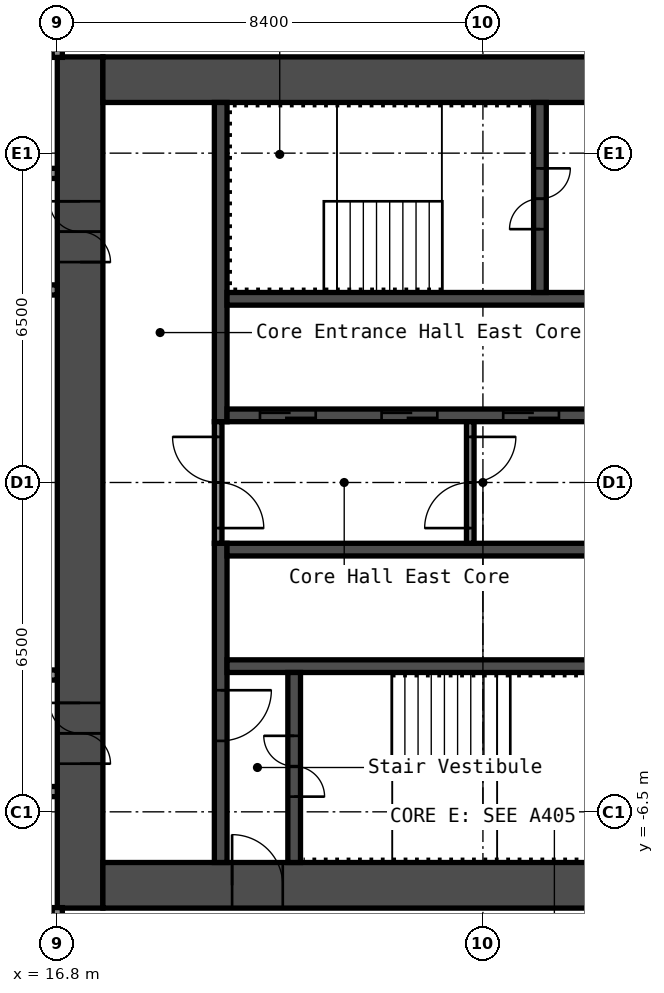
"""IFC4 building model, lengths in metres.
Left out: names, types, materials, properties, quantities, classifications, styles, units other than length and angle.
Written with IfcOpenShell. Run it as: python <this file> out.ifc"""

import sys

from ifc_helpers import new_model, si_unit, direction, frame, frame_2d, origin, place, context, subcontext, project, spatial, rectangle, extrude, element, fill, save


model = new_model("IFC4")
c1 = context("Model", 3, precision=1e-05, world=origin(), true_north=direction((0.0, 1.0)))
c2 = subcontext(c1, "Body", "Model", "MODEL_VIEW")
j1 = project(units=[si_unit("LENGTHUNIT", "METRE"), si_unit("PLANEANGLEUNIT", "RADIAN")], contexts=[c1])
p1 = place(None, origin())
s1 = spatial("IfcSite", under=j1, at=p1, CompositionType="ELEMENT")
p2 = place(p1, origin())
s2 = spatial("IfcBuilding", under=s1, at=p2, CompositionType="ELEMENT")
p3 = place(p2, frame((0.0, 0.0, 32.6)))
s3 = spatial("IfcBuildingStorey", under=s2, at=p3, CompositionType="ELEMENT", Elevation=32.6)
p4 = place(p3, frame((17.25, -8.4, 0.0), z_axis=(0.0, 0.0, 1.0), x_axis=(0.0, 1.0, 0.0)))
e1 = element("IfcWall", 1, at=p4, inside=s3, PredefinedType="SHEAR", context=c2, shape_type="SweptSolid", body=[
    extrude(rectangle(XDim=16.8, YDim=0.9, at=frame_2d((8.4, 0.0))), origin(), (0.0, 0.0, 1.0), 2.8),
])
p5 = place(p4, frame((12.75, 0.0, 0.0)))
e2 = element("IfcOpeningElement", 2, at=p5, cuts=e1, PredefinedType="OPENING", context=c2, shape_type="SweptSolid", body=[
    extrude(rectangle(XDim=1.2, YDim=2.1, at=frame_2d((0.6, 1.05))), frame((0.0, 0.46, 0.0), z_axis=(0.0, -1.0, 0.0), x_axis=(1.0, 0.0, 0.0)), (0.0, 0.0, 1.0), 0.92),
])
p6 = place(p4, frame((2.85, 0.0, 0.0)))
e3 = element("IfcOpeningElement", 3, at=p6, cuts=e1, PredefinedType="OPENING", context=c2, shape_type="SweptSolid", body=[
    extrude(rectangle(XDim=1.2, YDim=2.1, at=frame_2d((0.6, 1.05))), frame((0.0, 0.46, 0.0), z_axis=(0.0, -1.0, 0.0), x_axis=(1.0, 0.0, 0.0)), (0.0, 0.0, 1.0), 0.92),
])
p7 = place(p3, frame((17.7, 7.95, 0.0), z_axis=(0.0, 0.0, 1.0), x_axis=(1.0, 0.0, 0.0)))
e4 = element("IfcWall", 4, at=p7, inside=s3, PredefinedType="SHEAR", context=c2, shape_type="SweptSolid", body=[
    extrude(rectangle(XDim=15.0, YDim=0.9, at=frame_2d((7.5, 0.0))), origin(), (0.0, 0.0, 1.0), 2.8),
])
p8 = place(p7, frame((10.4, 0.0, 0.0)))
e5 = element("IfcOpeningElement", 5, at=p8, cuts=e4, PredefinedType="OPENING", context=c2, shape_type="SweptSolid", body=[
    extrude(rectangle(XDim=1.2, YDim=2.1, at=frame_2d((0.6, 1.05))), frame((0.0, 0.46, 0.0), z_axis=(0.0, -1.0, 0.0), x_axis=(1.0, 0.0, 0.0)), (0.0, 0.0, 1.0), 0.92),
])
p9 = place(p7, frame((13.35, 0.0, 0.0)))
e6 = element("IfcOpeningElement", 6, at=p9, cuts=e4, PredefinedType="OPENING", context=c2, shape_type="SweptSolid", body=[
    extrude(rectangle(XDim=0.9, YDim=2.1, at=frame_2d((0.45, 1.05))), frame((0.0, 0.46, 0.0), z_axis=(0.0, -1.0, 0.0), x_axis=(1.0, 0.0, 0.0)), (0.0, 0.0, 1.0), 0.92),
])
p10 = place(p3, frame((17.7, -7.95, 0.0), z_axis=(0.0, 0.0, 1.0), x_axis=(1.0, 0.0, 0.0)))
e7 = element("IfcWall", 7, at=p10, inside=s3, PredefinedType="SHEAR", context=c2, shape_type="SweptSolid", body=[
    extrude(rectangle(XDim=15.0, YDim=0.9, at=frame_2d((7.5, 0.0))), origin(), (0.0, 0.0, 1.0), 2.8),
])
p11 = place(p10, frame((2.55, 0.0, 0.0)))
e8 = element("IfcOpeningElement", 8, at=p11, cuts=e7, PredefinedType="OPENING", context=c2, shape_type="SweptSolid", body=[
    extrude(rectangle(XDim=1.0, YDim=2.1, at=frame_2d((0.5, 1.05))), frame((0.0, 0.46, 0.0), z_axis=(0.0, -1.0, 0.0), x_axis=(1.0, 0.0, 0.0)), (0.0, 0.0, 1.0), 0.92),
])
p12 = place(p3, frame((20.025, 1.2, 0.0), z_axis=(0.0, 0.0, 1.0), x_axis=(0.0, 1.0, 0.0)))
e9 = element("IfcWall", 9, at=p12, inside=s3, PredefinedType="SHEAR", context=c2, shape_type="SweptSolid", body=[
    extrude(rectangle(XDim=6.3, YDim=0.25, at=frame_2d((3.15, 0.0))), origin(), (0.0, 0.0, 1.0), 2.8),
])
p13 = place(p3, frame((20.025, -7.5, 0.0), z_axis=(0.0, 0.0, 1.0), x_axis=(0.0, 1.0, 0.0)))
e10 = element("IfcWall", 10, at=p13, inside=s3, PredefinedType="SHEAR", context=c2, shape_type="SweptSolid", body=[
    extrude(rectangle(XDim=6.3, YDim=0.25, at=frame_2d((3.15, 0.0))), origin(), (0.0, 0.0, 1.0), 2.8),
])
p14 = place(p13, frame((2.4, 0.0, 0.0)))
e11 = element("IfcOpeningElement", 11, at=p14, cuts=e10, PredefinedType="OPENING", context=c2, shape_type="SweptSolid", body=[
    extrude(rectangle(XDim=1.0, YDim=2.1, at=frame_2d((0.5, 1.05))), frame((0.0, 0.135, 0.0), z_axis=(0.0, -1.0, 0.0), x_axis=(1.0, 0.0, 0.0)), (0.0, 0.0, 1.0), 0.27),
])
p15 = place(p3, frame((20.15, 1.325, 0.0), z_axis=(0.0, 0.0, 1.0), x_axis=(1.0, 0.0, 0.0)))
e12 = element("IfcWall", 12, at=p15, inside=s3, PredefinedType="SHEAR", context=c2, shape_type="SweptSolid", body=[
    extrude(rectangle(XDim=7.5, YDim=0.25, at=frame_2d((3.75, 0.0))), origin(), (0.0, 0.0, 1.0), 2.8),
])
p16 = place(p15, frame((0.65, 0.0, 0.0)))
e13 = element("IfcOpeningElement", 13, at=p16, cuts=e12, PredefinedType="OPENING", context=c2, shape_type="SweptSolid", body=[
    extrude(rectangle(XDim=1.1, YDim=2.1, at=frame_2d((0.55, 1.05))), frame((0.0, 0.135, 0.0), z_axis=(0.0, -1.0, 0.0), x_axis=(1.0, 0.0, 0.0)), (0.0, 0.0, 1.0), 0.27),
])
p17 = place(p15, frame((3.05, 0.0, 0.0)))
e14 = element("IfcOpeningElement", 14, at=p17, cuts=e12, PredefinedType="OPENING", context=c2, shape_type="SweptSolid", body=[
    extrude(rectangle(XDim=1.1, YDim=2.1, at=frame_2d((0.55, 1.05))), frame((0.0, 0.135, 0.0), z_axis=(0.0, -1.0, 0.0), x_axis=(1.0, 0.0, 0.0)), (0.0, 0.0, 1.0), 0.27),
])
p18 = place(p15, frame((5.45, 0.0, 0.0)))
e15 = element("IfcOpeningElement", 15, at=p18, cuts=e12, PredefinedType="OPENING", context=c2, shape_type="SweptSolid", body=[
    extrude(rectangle(XDim=1.1, YDim=2.1, at=frame_2d((0.55, 1.05))), frame((0.0, 0.135, 0.0), z_axis=(0.0, -1.0, 0.0), x_axis=(1.0, 0.0, 0.0)), (0.0, 0.0, 1.0), 0.27),
])
p19 = place(p3, frame((20.15, 3.625, 0.0), z_axis=(0.0, 0.0, 1.0), x_axis=(1.0, 0.0, 0.0)))
e16 = element("IfcWall", 16, at=p19, inside=s3, PredefinedType="SHEAR", context=c2, shape_type="SweptSolid", body=[
    extrude(rectangle(XDim=7.5, YDim=0.25, at=frame_2d((3.75, 0.0))), origin(), (0.0, 0.0, 1.0), 2.8),
])
p20 = place(p3, frame((26.325, 3.75, 0.0), z_axis=(0.0, 0.0, 1.0), x_axis=(0.0, 1.0, 0.0)))
e17 = element("IfcWall", 17, at=p20, inside=s3, PredefinedType="SHEAR", context=c2, shape_type="SweptSolid", body=[
    extrude(rectangle(XDim=3.75, YDim=0.25, at=frame_2d((1.875, 0.0))), origin(), (0.0, 0.0, 1.0), 2.8),
])
p21 = place(p20, frame((1.25, 0.0, 0.0)))
e18 = element("IfcOpeningElement", 18, at=p21, cuts=e17, PredefinedType="OPENING", context=c2, shape_type="SweptSolid", body=[
    extrude(rectangle(XDim=1.2, YDim=2.1, at=frame_2d((0.6, 1.05))), frame((0.0, 0.135, 0.0), z_axis=(0.0, -1.0, 0.0), x_axis=(1.0, 0.0, 0.0)), (0.0, 0.0, 1.0), 0.27),
])
for number, where, z_axis, x_axis in (
    (19, (20.15, -1.325, 0.0), (0.0, 0.0, 1.0), (1.0, 0.0, 0.0)),
    (20, (20.15, -3.625, 0.0), (0.0, 0.0, 1.0), (1.0, 0.0, 0.0)),
):
    element("IfcWall", number, at=place(p3, frame(where, z_axis=z_axis, x_axis=x_axis)), inside=s3, PredefinedType="SHEAR", context=c2, shape_type="SweptSolid", body=[
        extrude(rectangle(XDim=7.5, YDim=0.25, at=frame_2d((3.75, 0.0))), origin(), (0.0, 0.0, 1.0), 2.8),
    ])
p22 = place(p3, frame((21.475, -7.5, 0.0), z_axis=(0.0, 0.0, 1.0), x_axis=(0.0, 1.0, 0.0)))
e21 = element("IfcWall", 21, at=p22, inside=s3, PredefinedType="SHEAR", context=c2, shape_type="SweptSolid", body=[
    extrude(rectangle(XDim=3.75, YDim=0.25, at=frame_2d((1.875, 0.0))), origin(), (0.0, 0.0, 1.0), 2.8),
])
p23 = place(p22, frame((1.3, 0.0, 0.0)))
e22 = element("IfcOpeningElement", 22, at=p23, cuts=e21, PredefinedType="OPENING", context=c2, shape_type="SweptSolid", body=[
    extrude(rectangle(XDim=1.2, YDim=2.1, at=frame_2d((0.6, 1.05))), frame((0.0, 0.135, 0.0), z_axis=(0.0, -1.0, 0.0), x_axis=(1.0, 0.0, 0.0)), (0.0, 0.0, 1.0), 0.27),
])
p24 = place(p3, frame((19.975, -1.2, 0.0), z_axis=(0.0, 0.0, 1.0), x_axis=(0.0, 1.0, 0.0)))
e23 = element("IfcWall", 23, at=p24, inside=s3, PredefinedType="PARTITIONING", context=c2, shape_type="SweptSolid", body=[
    extrude(rectangle(XDim=2.4, YDim=0.15, at=frame_2d((1.2, 0.0))), origin(), (0.0, 0.0, 1.0), 2.8),
])
p25 = place(p24, frame((0.3, 0.0, 0.0)))
e24 = element("IfcOpeningElement", 24, at=p25, cuts=e23, PredefinedType="OPENING", context=c2, shape_type="SweptSolid", body=[
    extrude(rectangle(XDim=1.8, YDim=2.1, at=frame_2d((0.9, 1.05))), frame((0.0, 0.085, 0.0), z_axis=(0.0, -1.0, 0.0), x_axis=(1.0, 0.0, 0.0)), (0.0, 0.0, 1.0), 0.17),
])
p26 = place(p3, frame((24.95, -1.2, 0.0), z_axis=(0.0, 0.0, 1.0), x_axis=(0.0, 1.0, 0.0)))
e25 = element("IfcWall", 25, at=p26, inside=s3, PredefinedType="PARTITIONING", context=c2, shape_type="SweptSolid", body=[
    extrude(rectangle(XDim=2.4, YDim=0.15, at=frame_2d((1.2, 0.0))), origin(), (0.0, 0.0, 1.0), 2.8),
])
p27 = place(p26, frame((0.3, 0.0, 0.0)))
e26 = element("IfcOpeningElement", 26, at=p27, cuts=e25, PredefinedType="OPENING", context=c2, shape_type="SweptSolid", body=[
    extrude(rectangle(XDim=1.8, YDim=2.1, at=frame_2d((0.9, 1.05))), frame((0.0, 0.085, 0.0), z_axis=(0.0, -1.0, 0.0), x_axis=(1.0, 0.0, 0.0)), (0.0, 0.0, 1.0), 0.17),
])
p28 = place(p3, frame((-16.8, -6.1, 0.0), z_axis=(0.0, 0.0, 1.0), x_axis=(1.0, 0.0, 0.0)))
e27 = element("IfcWall", 27, at=p28, inside=s3, PredefinedType="PARTITIONING", context=c2, shape_type="SweptSolid", body=[
    extrude(rectangle(XDim=33.6, YDim=0.2, at=frame_2d((16.8, 0.0))), origin(), (0.0, 0.0, 1.0), 2.8),
])
p29 = place(p28, frame((1.6, 0.0, 0.0)))
e28 = element("IfcOpeningElement", 28, at=p29, cuts=e27, PredefinedType="OPENING", context=c2, shape_type="SweptSolid", body=[
    extrude(rectangle(XDim=1.0, YDim=2.1, at=frame_2d((0.5, 1.05))), frame((0.0, 0.11, 0.0), z_axis=(0.0, -1.0, 0.0), x_axis=(1.0, 0.0, 0.0)), (0.0, 0.0, 1.0), 0.22),
])
p30 = place(p28, frame((10.0, 0.0, 0.0)))
e29 = element("IfcOpeningElement", 29, at=p30, cuts=e27, PredefinedType="OPENING", context=c2, shape_type="SweptSolid", body=[
    extrude(rectangle(XDim=1.0, YDim=2.1, at=frame_2d((0.5, 1.05))), frame((0.0, 0.11, 0.0), z_axis=(0.0, -1.0, 0.0), x_axis=(1.0, 0.0, 0.0)), (0.0, 0.0, 1.0), 0.22),
])
p31 = place(p28, frame((22.6, 0.0, 0.0)))
e30 = element("IfcOpeningElement", 30, at=p31, cuts=e27, PredefinedType="OPENING", context=c2, shape_type="SweptSolid", body=[
    extrude(rectangle(XDim=1.0, YDim=2.1, at=frame_2d((0.5, 1.05))), frame((0.0, 0.11, 0.0), z_axis=(0.0, -1.0, 0.0), x_axis=(1.0, 0.0, 0.0)), (0.0, 0.0, 1.0), 0.22),
])
p32 = place(p28, frame((27.1, 0.0, 0.0)))
e31 = element("IfcOpeningElement", 31, at=p32, cuts=e27, PredefinedType="OPENING", context=c2, shape_type="SweptSolid", body=[
    extrude(rectangle(XDim=1.0, YDim=2.1, at=frame_2d((0.5, 1.05))), frame((0.0, 0.11, 0.0), z_axis=(0.0, -1.0, 0.0), x_axis=(1.0, 0.0, 0.0)), (0.0, 0.0, 1.0), 0.22),
])
p33 = place(p3, frame((-16.8, -3.8, 0.0), z_axis=(0.0, 0.0, 1.0), x_axis=(1.0, 0.0, 0.0)))
e32 = element("IfcWall", 32, at=p33, inside=s3, PredefinedType="PARTITIONING", context=c2, shape_type="SweptSolid", body=[
    extrude(rectangle(XDim=33.6, YDim=0.2, at=frame_2d((16.8, 0.0))), origin(), (0.0, 0.0, 1.0), 2.8),
])
p34 = place(p33, frame((10.3, 0.0, 0.0)))
e33 = element("IfcOpeningElement", 33, at=p34, cuts=e32, PredefinedType="OPENING", context=c2, shape_type="SweptSolid", body=[
    extrude(rectangle(XDim=0.9, YDim=2.1, at=frame_2d((0.45, 1.05))), frame((0.0, 0.11, 0.0), z_axis=(0.0, -1.0, 0.0), x_axis=(1.0, 0.0, 0.0)), (0.0, 0.0, 1.0), 0.22),
])
p35 = place(p33, frame((14.5, 0.0, 0.0)))
e34 = element("IfcOpeningElement", 34, at=p35, cuts=e32, PredefinedType="OPENING", context=c2, shape_type="SweptSolid", body=[
    extrude(rectangle(XDim=0.9, YDim=2.1, at=frame_2d((0.45, 1.05))), frame((0.0, 0.11, 0.0), z_axis=(0.0, -1.0, 0.0), x_axis=(1.0, 0.0, 0.0)), (0.0, 0.0, 1.0), 0.22),
])
p36 = place(p33, frame((27.02, 0.0, 0.0)))
e35 = element("IfcOpeningElement", 35, at=p36, cuts=e32, PredefinedType="OPENING", context=c2, shape_type="SweptSolid", body=[
    extrude(rectangle(XDim=0.9, YDim=2.1, at=frame_2d((0.45, 1.05))), frame((0.0, 0.11, 0.0), z_axis=(0.0, -1.0, 0.0), x_axis=(1.0, 0.0, 0.0)), (0.0, 0.0, 1.0), 0.22),
])
p37 = place(p33, frame((31.22, 0.0, 0.0)))
e36 = element("IfcOpeningElement", 36, at=p37, cuts=e32, PredefinedType="OPENING", context=c2, shape_type="SweptSolid", body=[
    extrude(rectangle(XDim=0.9, YDim=2.1, at=frame_2d((0.45, 1.05))), frame((0.0, 0.11, 0.0), z_axis=(0.0, -1.0, 0.0), x_axis=(1.0, 0.0, 0.0)), (0.0, 0.0, 1.0), 0.22),
])
p38 = place(p3, frame((-16.8, 3.8, 0.0), z_axis=(0.0, 0.0, 1.0), x_axis=(1.0, 0.0, 0.0)))
e37 = element("IfcWall", 37, at=p38, inside=s3, PredefinedType="PARTITIONING", context=c2, shape_type="SweptSolid", body=[
    extrude(rectangle(XDim=33.6, YDim=0.2, at=frame_2d((16.8, 0.0))), origin(), (0.0, 0.0, 1.0), 2.8),
])
p39 = place(p38, frame((1.4, 0.0, 0.0)))
e38 = element("IfcOpeningElement", 38, at=p39, cuts=e37, PredefinedType="OPENING", context=c2, shape_type="SweptSolid", body=[
    extrude(rectangle(XDim=0.9, YDim=2.1, at=frame_2d((0.45, 1.05))), frame((0.0, 0.11, 0.0), z_axis=(0.0, -1.0, 0.0), x_axis=(1.0, 0.0, 0.0)), (0.0, 0.0, 1.0), 0.22),
])
p40 = place(p38, frame((5.6, 0.0, 0.0)))
e39 = element("IfcOpeningElement", 39, at=p40, cuts=e37, PredefinedType="OPENING", context=c2, shape_type="SweptSolid", body=[
    extrude(rectangle(XDim=0.9, YDim=2.1, at=frame_2d((0.45, 1.05))), frame((0.0, 0.11, 0.0), z_axis=(0.0, -1.0, 0.0), x_axis=(1.0, 0.0, 0.0)), (0.0, 0.0, 1.0), 0.22),
])
p41 = place(p38, frame((18.87, 0.0, 0.0)))
e40 = element("IfcOpeningElement", 40, at=p41, cuts=e37, PredefinedType="OPENING", context=c2, shape_type="SweptSolid", body=[
    extrude(rectangle(XDim=0.9, YDim=2.1, at=frame_2d((0.45, 1.05))), frame((0.0, 0.11, 0.0), z_axis=(0.0, -1.0, 0.0), x_axis=(1.0, 0.0, 0.0)), (0.0, 0.0, 1.0), 0.22),
])
p42 = place(p38, frame((23.07, 0.0, 0.0)))
e41 = element("IfcOpeningElement", 41, at=p42, cuts=e37, PredefinedType="OPENING", context=c2, shape_type="SweptSolid", body=[
    extrude(rectangle(XDim=0.9, YDim=2.1, at=frame_2d((0.45, 1.05))), frame((0.0, 0.11, 0.0), z_axis=(0.0, -1.0, 0.0), x_axis=(1.0, 0.0, 0.0)), (0.0, 0.0, 1.0), 0.22),
])
p43 = place(p3, frame((-16.8, 6.1, 0.0), z_axis=(0.0, 0.0, 1.0), x_axis=(1.0, 0.0, 0.0)))
e42 = element("IfcWall", 42, at=p43, inside=s3, PredefinedType="PARTITIONING", context=c2, shape_type="SweptSolid", body=[
    extrude(rectangle(XDim=33.6, YDim=0.2, at=frame_2d((16.8, 0.0))), origin(), (0.0, 0.0, 1.0), 2.8),
])
p44 = place(p43, frame((1.9, 0.0, 0.0)))
e43 = element("IfcOpeningElement", 43, at=p44, cuts=e42, PredefinedType="OPENING", context=c2, shape_type="SweptSolid", body=[
    extrude(rectangle(XDim=1.0, YDim=2.1, at=frame_2d((0.5, 1.05))), frame((0.0, 0.11, 0.0), z_axis=(0.0, -1.0, 0.0), x_axis=(1.0, 0.0, 0.0)), (0.0, 0.0, 1.0), 0.22),
])
p45 = place(p43, frame((14.2, 0.0, 0.0)))
e44 = element("IfcOpeningElement", 44, at=p45, cuts=e42, PredefinedType="OPENING", context=c2, shape_type="SweptSolid", body=[
    extrude(rectangle(XDim=1.0, YDim=2.1, at=frame_2d((0.5, 1.05))), frame((0.0, 0.11, 0.0), z_axis=(0.0, -1.0, 0.0), x_axis=(1.0, 0.0, 0.0)), (0.0, 0.0, 1.0), 0.22),
])
p46 = place(p43, frame((18.4, 0.0, 0.0)))
e45 = element("IfcOpeningElement", 45, at=p46, cuts=e42, PredefinedType="OPENING", context=c2, shape_type="SweptSolid", body=[
    extrude(rectangle(XDim=1.0, YDim=2.1, at=frame_2d((0.5, 1.05))), frame((0.0, 0.11, 0.0), z_axis=(0.0, -1.0, 0.0), x_axis=(1.0, 0.0, 0.0)), (0.0, 0.0, 1.0), 0.22),
])
p47 = place(p43, frame((31.0, 0.0, 0.0)))
e46 = element("IfcOpeningElement", 46, at=p47, cuts=e42, PredefinedType="OPENING", context=c2, shape_type="SweptSolid", body=[
    extrude(rectangle(XDim=1.0, YDim=2.1, at=frame_2d((0.5, 1.05))), frame((0.0, 0.11, 0.0), z_axis=(0.0, -1.0, 0.0), x_axis=(1.0, 0.0, 0.0)), (0.0, 0.0, 1.0), 0.22),
])
for number, where, z_axis, x_axis in (
    (47, (16.8, -20.3, 0.0), (0.0, 0.0, 1.0), (0.0, 1.0, 0.0)),
    (48, (16.8, 8.39, 0.0), (0.0, 0.0, 1.0), (0.0, 1.0, 0.0)),
):
    element("IfcWall", number, at=place(p3, frame(where, z_axis=z_axis, x_axis=x_axis)), inside=s3, PredefinedType="PARTITIONING", context=c2, shape_type="SweptSolid", body=[
        extrude(rectangle(XDim=11.91, YDim=0.2, at=frame_2d((5.955, 0.0))), origin(), (0.0, 0.0, 1.0), 2.8),
    ])
p48 = place(p5, origin())
e49 = element("IfcDoor", 49, at=p48, inside=s3, OperationType="DOUBLE_DOOR_SINGLE_SWING", PredefinedType="DOOR", context=c2, shape_type="SweptSolid", body=[
    extrude(rectangle(XDim=1.2, YDim=2.1, at=frame_2d((0.6, 1.05))), frame((0.0, 0.025, 0.0), z_axis=(0.0, -1.0, 0.0), x_axis=(1.0, 0.0, 0.0)), (0.0, 0.0, 1.0), 0.05),
])
fill(e2, e49)
p49 = place(p6, origin())
e50 = element("IfcDoor", 50, at=p49, inside=s3, OperationType="DOUBLE_DOOR_SINGLE_SWING", PredefinedType="DOOR", context=c2, shape_type="SweptSolid", body=[
    extrude(rectangle(XDim=1.2, YDim=2.1, at=frame_2d((0.6, 1.05))), frame((0.0, 0.025, 0.0), z_axis=(0.0, -1.0, 0.0), x_axis=(1.0, 0.0, 0.0)), (0.0, 0.0, 1.0), 0.05),
])
fill(e3, e50)
p50 = place(p11, origin())
e51 = element("IfcDoor", 51, at=p50, inside=s3, OperationType="SINGLE_SWING_RIGHT", PredefinedType="DOOR", context=c2, shape_type="SweptSolid", body=[
    extrude(rectangle(XDim=1.0, YDim=2.1, at=frame_2d((0.5, 1.05))), frame((0.0, 0.025, 0.0), z_axis=(0.0, -1.0, 0.0), x_axis=(1.0, 0.0, 0.0)), (0.0, 0.0, 1.0), 0.05),
])
fill(e8, e51)
p51 = place(p21, origin())
e52 = element("IfcDoor", 52, at=p51, inside=s3, OperationType="DOUBLE_DOOR_SINGLE_SWING", PredefinedType="DOOR", context=c2, shape_type="SweptSolid", body=[
    extrude(rectangle(XDim=1.2, YDim=2.1, at=frame_2d((0.6, 1.05))), frame((0.0, 0.025, 0.0), z_axis=(0.0, -1.0, 0.0), x_axis=(1.0, 0.0, 0.0)), (0.0, 0.0, 1.0), 0.05),
])
fill(e18, e52)
p52 = place(p23, origin())
e53 = element("IfcDoor", 53, at=p52, inside=s3, OperationType="DOUBLE_DOOR_SINGLE_SWING", PredefinedType="DOOR", context=c2, shape_type="SweptSolid", body=[
    extrude(rectangle(XDim=1.2, YDim=2.1, at=frame_2d((0.6, 1.05))), frame((0.0, 0.025, 0.0), z_axis=(0.0, -1.0, 0.0), x_axis=(1.0, 0.0, 0.0)), (0.0, 0.0, 1.0), 0.05),
])
fill(e22, e53)
p53 = place(p14, origin())
e54 = element("IfcDoor", 54, at=p53, inside=s3, OperationType="SINGLE_SWING_RIGHT", PredefinedType="DOOR", context=c2, shape_type="SweptSolid", body=[
    extrude(rectangle(XDim=1.0, YDim=2.1, at=frame_2d((0.5, 1.05))), frame((0.0, 0.025, 0.0), z_axis=(0.0, -1.0, 0.0), x_axis=(1.0, 0.0, 0.0)), (0.0, 0.0, 1.0), 0.05),
])
fill(e11, e54)
p54 = place(p25, origin())
e55 = element("IfcDoor", 55, at=p54, inside=s3, OperationType="DOUBLE_DOOR_SINGLE_SWING", PredefinedType="DOOR", context=c2, shape_type="SweptSolid", body=[
    extrude(rectangle(XDim=1.8, YDim=2.1, at=frame_2d((0.9, 1.05))), frame((0.0, 0.025, 0.0), z_axis=(0.0, -1.0, 0.0), x_axis=(1.0, 0.0, 0.0)), (0.0, 0.0, 1.0), 0.05),
])
fill(e24, e55)
p55 = place(p27, origin())
e56 = element("IfcDoor", 56, at=p55, inside=s3, OperationType="DOUBLE_DOOR_SINGLE_SWING", PredefinedType="DOOR", context=c2, shape_type="SweptSolid", body=[
    extrude(rectangle(XDim=1.8, YDim=2.1, at=frame_2d((0.9, 1.05))), frame((0.0, 0.025, 0.0), z_axis=(0.0, -1.0, 0.0), x_axis=(1.0, 0.0, 0.0)), (0.0, 0.0, 1.0), 0.05),
])
fill(e26, e56)
p56 = place(p16, origin())
e57 = element("IfcDoor", 57, at=p56, inside=s3, OperationType="DOUBLE_DOOR_SLIDING", PredefinedType="DOOR", context=c2, shape_type="SweptSolid", body=[
    extrude(rectangle(XDim=1.1, YDim=2.1, at=frame_2d((0.55, 1.05))), frame((0.0, 0.025, 0.0), z_axis=(0.0, -1.0, 0.0), x_axis=(1.0, 0.0, 0.0)), (0.0, 0.0, 1.0), 0.05),
])
fill(e13, e57)
p57 = place(p17, origin())
e58 = element("IfcDoor", 58, at=p57, inside=s3, OperationType="DOUBLE_DOOR_SLIDING", PredefinedType="DOOR", context=c2, shape_type="SweptSolid", body=[
    extrude(rectangle(XDim=1.1, YDim=2.1, at=frame_2d((0.55, 1.05))), frame((0.0, 0.025, 0.0), z_axis=(0.0, -1.0, 0.0), x_axis=(1.0, 0.0, 0.0)), (0.0, 0.0, 1.0), 0.05),
])
fill(e14, e58)
p58 = place(p18, origin())
e59 = element("IfcDoor", 59, at=p58, inside=s3, OperationType="DOUBLE_DOOR_SLIDING", PredefinedType="DOOR", context=c2, shape_type="SweptSolid", body=[
    extrude(rectangle(XDim=1.1, YDim=2.1, at=frame_2d((0.55, 1.05))), frame((0.0, 0.025, 0.0), z_axis=(0.0, -1.0, 0.0), x_axis=(1.0, 0.0, 0.0)), (0.0, 0.0, 1.0), 0.05),
])
fill(e15, e59)
save(model, sys.argv[1])
